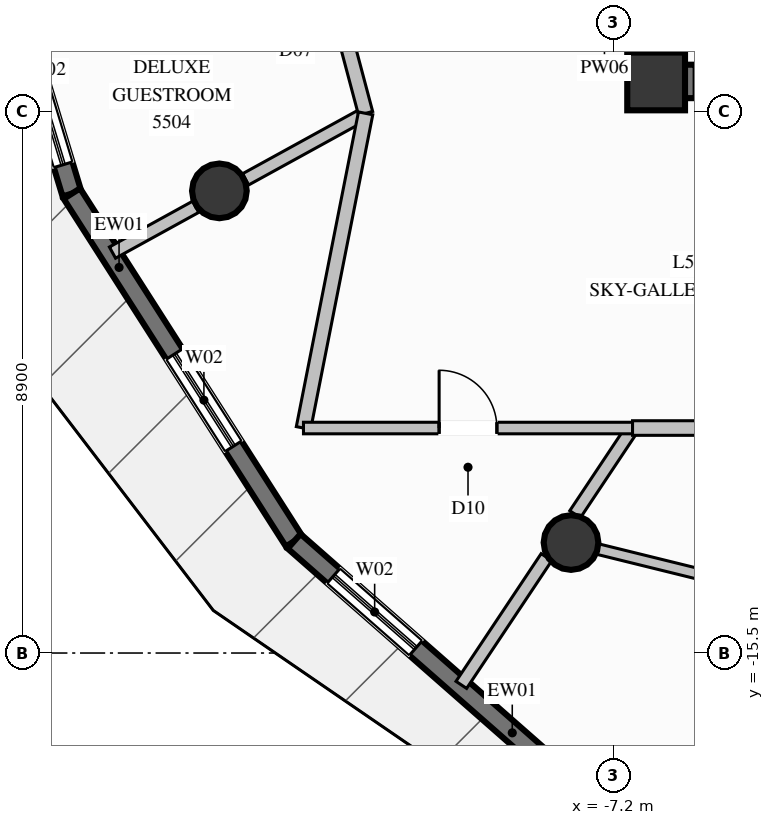
"""IFC4 building model, lengths in metres.
Left out: names, types, materials, properties, quantities, classifications, styles, units other than length and angle.
Written with IfcOpenShell. Run it as: python <this file> out.ifc"""

import sys

from ifc_helpers import new_model, si_unit, direction, frame, frame_2d, origin, origin_2d, place, context, subcontext, project, spatial, rectangle, circle, extrude, element, fill, save


model = new_model("IFC4")
c1 = context("Model", 3, precision=1e-05, world=origin(), true_north=direction((0.0, 1.0)))
c2 = subcontext(c1, "Body", "Model", "MODEL_VIEW")
j1 = project(units=[si_unit("LENGTHUNIT", "METRE"), si_unit("PLANEANGLEUNIT", "RADIAN")], contexts=[c1])
p1 = place(None, origin())
s1 = spatial("IfcSite", under=j1, at=p1, CompositionType="ELEMENT")
p2 = place(p1, origin())
s2 = spatial("IfcBuilding", under=s1, at=p2, CompositionType="ELEMENT")
p3 = place(p2, frame((0.0, 0.0, 205.6)))
s3 = spatial("IfcBuildingStorey", under=s2, at=p3, CompositionType="ELEMENT", Elevation=205.6)
p4 = place(p3, frame((-6.5, -6.1, 0.0), z_axis=(0.0, 0.0, 1.0), x_axis=(1.0, 0.0, 0.0)))
e1 = element("IfcColumn", 1, at=p4, inside=s3, PredefinedType="COLUMN", context=c2, shape_type="SweptSolid", body=[
    extrude(rectangle(XDim=0.95, YDim=0.95, at=origin_2d()), origin(), (0.0, 0.0, 1.0), 3.6),
])
p5 = place(p3, frame((-6.225, -6.1, 0.0), z_axis=(0.0, 0.0, 1.0), x_axis=(1.0, 0.0, 0.0)))
e2 = element("IfcWall", 2, at=p5, inside=s3, PredefinedType="SHEAR", context=c2, shape_type="SweptSolid", body=[
    extrude(rectangle(XDim=0.375, YDim=0.55, at=frame_2d((0.188, 0.0))), origin(), (0.0, 0.0, 1.0), 3.6),
])
p6 = place(p3, frame((-6.5, -6.375, 0.0), z_axis=(0.0, 0.0, 1.0), x_axis=(0.0, 1.0, 0.0)))
e3 = element("IfcWall", 3, at=p6, inside=s3, PredefinedType="SHEAR", context=c2, shape_type="SweptSolid", body=[
    extrude(rectangle(XDim=3.025, YDim=0.55, at=frame_2d((1.512, 0.0))), origin(), (0.0, 0.0, 1.0), 3.6),
])
for number, where, z_axis, x_axis in (
    (4, (-13.683, -7.9, 0.0), (0.0, 0.0, 1.0), (1.0, 0.0, 0.0)),
    (5, (-7.9, -13.683, 0.0), (0.0, 0.0, 1.0), (1.0, 0.0, 0.0)),
):
    element("IfcColumn", number, at=place(p3, frame(where, z_axis=z_axis, x_axis=x_axis)), inside=s3, PredefinedType="COLUMN", context=c2, shape_type="SweptSolid", body=[
        extrude(circle(Radius=0.45, at=origin_2d()), origin(), (0.0, 0.0, 1.0), 3.6),
    ])
p7 = place(p3, frame((-16.109, -7.945, 0.0), z_axis=(0.0, 0.0, 1.0), x_axis=(-0.289756727298, 0.957100328589, 0.0)))
e6 = element("IfcWall", 6, at=p7, inside=s3, PredefinedType="SOLIDWALL", context=c2, shape_type="SweptSolid", body=[
    extrude(rectangle(XDim=6.785, YDim=0.32, at=frame_2d((3.393, 0.0))), origin(), (0.0, 0.0, 1.0), 3.36),
])
p8 = place(p7, frame((0.496, 0.0, 0.35)))
e7 = element("IfcOpeningElement", 7, at=p8, cuts=e6, PredefinedType="OPENING", context=c2, shape_type="SweptSolid", body=[
    extrude(rectangle(XDim=1.8, YDim=2.6, at=frame_2d((0.9, 1.3))), frame((0.0, 0.17, 0.0), z_axis=(0.0, -1.0, 0.0), x_axis=(1.0, 0.0, 0.0)), (0.0, 0.0, 1.0), 0.34),
])
p9 = place(p7, frame((2.843, 0.0, 0.0)))
e8 = element("IfcOpeningElement", 8, at=p9, cuts=e6, PredefinedType="OPENING", context=c2, shape_type="SweptSolid", body=[
    extrude(rectangle(XDim=1.1, YDim=2.2, at=frame_2d((0.55, 1.1))), frame((0.0, 0.17, 0.0), z_axis=(0.0, -1.0, 0.0), x_axis=(1.0, 0.0, 0.0)), (0.0, 0.0, 1.0), 0.34),
])
p10 = place(p3, frame((-12.454, -13.662, 0.0), z_axis=(0.0, 0.0, 1.0), x_axis=(-0.538622762642, 0.842547042938, 0.0)))
e9 = element("IfcWall", 9, at=p10, inside=s3, PredefinedType="SOLIDWALL", context=c2, shape_type="SweptSolid", body=[
    extrude(rectangle(XDim=6.785, YDim=0.32, at=frame_2d((3.393, 0.0))), origin(), (0.0, 0.0, 1.0), 3.36),
])
p11 = place(p10, frame((1.854, 0.0, 0.35)))
e10 = element("IfcOpeningElement", 10, at=p11, cuts=e9, PredefinedType="OPENING", context=c2, shape_type="SweptSolid", body=[
    extrude(rectangle(XDim=1.8, YDim=2.6, at=frame_2d((0.9, 1.3))), frame((0.0, 0.17, 0.0), z_axis=(0.0, -1.0, 0.0), x_axis=(1.0, 0.0, 0.0)), (0.0, 0.0, 1.0), 0.34),
])
p12 = place(p3, frame((-7.467, -18.041, 0.0), z_axis=(0.0, 0.0, 1.0), x_axis=(-0.751438445652, 0.659803199746, 0.0)))
e11 = element("IfcWall", 11, at=p12, inside=s3, PredefinedType="SOLIDWALL", context=c2, shape_type="SweptSolid", body=[
    extrude(rectangle(XDim=6.637, YDim=0.32, at=frame_2d((3.318, 0.0))), origin(), (0.0, 0.0, 1.0), 3.36),
])
p13 = place(p12, frame((3.974, 0.0, 0.35)))
e12 = element("IfcOpeningElement", 12, at=p13, cuts=e11, PredefinedType="OPENING", context=c2, shape_type="SweptSolid", body=[
    extrude(rectangle(XDim=1.8, YDim=2.6, at=frame_2d((0.9, 1.3))), frame((0.0, 0.17, 0.0), z_axis=(0.0, -1.0, 0.0), x_axis=(1.0, 0.0, 0.0)), (0.0, 0.0, 1.0), 0.34),
])
p14 = place(p3, frame((-11.278, -6.625, 0.0), z_axis=(0.0, 0.0, 1.0), x_axis=(-0.876259360779, -0.481839737513, 0.0)))
e13 = element("IfcWall", 13, at=p14, inside=s3, PredefinedType="PARTITIONING", context=c2, shape_type="SweptSolid", body=[
    extrude(rectangle(XDim=2.254, YDim=0.21, at=frame_2d((1.127, 0.0))), origin(), (0.0, 0.0, 1.0), 2.877),
])
p15 = place(p3, frame((-14.073, -8.162, 0.0), z_axis=(0.0, 0.0, 1.0), x_axis=(-0.876060708042, -0.482200825201, 0.0)))
e14 = element("IfcWall", 14, at=p15, inside=s3, PredefinedType="PARTITIONING", context=c2, shape_type="SweptSolid", body=[
    extrude(rectangle(XDim=1.562, YDim=0.21, at=frame_2d((0.781, 0.0))), origin(), (0.0, 0.0, 1.0), 3.36),
])
p16 = place(p3, frame((-12.277, -2.869, 0.0), z_axis=(0.0, 0.0, 1.0), x_axis=(0.257037057674, -0.966401547486, 0.0)))
e15 = element("IfcWall", 15, at=p16, inside=s3, PredefinedType="PARTITIONING", context=c2, shape_type="SweptSolid", body=[
    extrude(rectangle(XDim=3.887, YDim=0.24, at=frame_2d((1.943, 0.0))), origin(), (0.0, 0.0, 1.0), 3.36),
])
p17 = place(p16, frame((1.443, 0.0, 0.0)))
e16 = element("IfcOpeningElement", 16, at=p17, cuts=e15, PredefinedType="OPENING", context=c2, shape_type="SweptSolid", body=[
    extrude(rectangle(XDim=1.0, YDim=2.2, at=frame_2d((0.5, 1.1))), frame((0.0, 0.13, 0.0), z_axis=(0.0, -1.0, 0.0), x_axis=(1.0, 0.0, 0.0)), (0.0, 0.0, 1.0), 0.26),
])
p18 = place(p3, frame((-6.888, -11.8, 0.0), z_axis=(0.0, 0.0, 1.0), x_axis=(-0.554601004854, -0.832116413379, 0.0)))
e17 = element("IfcWall", 17, at=p18, inside=s3, PredefinedType="PARTITIONING", context=c2, shape_type="SweptSolid", body=[
    extrude(rectangle(XDim=1.704, YDim=0.21, at=frame_2d((0.852, 0.0))), origin(), (0.0, 0.0, 1.0), 2.877),
])
p19 = place(p3, frame((-8.304, -13.924, 0.0), z_axis=(0.0, 0.0, 1.0), x_axis=(-0.55476716384, -0.832005645368, 0.0)))
e18 = element("IfcWall", 18, at=p19, inside=s3, PredefinedType="PARTITIONING", context=c2, shape_type="SweptSolid", body=[
    extrude(rectangle(XDim=2.524, YDim=0.21, at=frame_2d((1.262, 0.0))), origin(), (0.0, 0.0, 1.0), 3.36),
])
p20 = place(p3, frame((-11.278, -6.625, 0.0), z_axis=(0.0, 0.0, 1.0), x_axis=(-0.193739123744, -0.981053083136, 0.0)))
e19 = element("IfcWall", 19, at=p20, inside=s3, PredefinedType="PARTITIONING", context=c2, shape_type="SweptSolid", body=[
    extrude(rectangle(XDim=5.275, YDim=0.24, at=frame_2d((2.637, 0.0))), origin(), (0.0, 0.0, 1.0), 3.36),
])
p21 = place(p3, frame((-12.3, -11.8, 0.0), z_axis=(0.0, 0.0, 1.0), x_axis=(1.0, 0.0, 0.0)))
e20 = element("IfcWall", 20, at=p21, inside=s3, PredefinedType="PARTITIONING", context=c2, shape_type="SweptSolid", body=[
    extrude(rectangle(XDim=5.412, YDim=0.19, at=frame_2d((2.706, 0.0))), origin(), (0.0, 0.0, 1.0), 3.36),
])
p22 = place(p21, frame((2.231, 0.0, 0.0)))
e21 = element("IfcOpeningElement", 21, at=p22, cuts=e20, PredefinedType="OPENING", context=c2, shape_type="SweptSolid", body=[
    extrude(rectangle(XDim=0.95, YDim=2.1, at=frame_2d((0.475, 1.05))), frame((0.0, 0.105, 0.0), z_axis=(0.0, -1.0, 0.0), x_axis=(1.0, 0.0, 0.0)), (0.0, 0.0, 1.0), 0.21),
])
p23 = place(p3, frame((-6.888, -11.8, 0.0), z_axis=(0.0, 0.0, 1.0), x_axis=(1.0, 0.0, 0.0)))
e22 = element("IfcWall", 22, at=p23, inside=s3, PredefinedType="PARTITIONING", context=c2, shape_type="SweptSolid", body=[
    extrude(rectangle(XDim=3.031, YDim=0.24, at=frame_2d((1.516, 0.0))), origin(), (0.0, 0.0, 1.0), 3.36),
])
p24 = place(p3, frame((-8.108, -13.631, 0.0), z_axis=(0.0, 0.0, 1.0), x_axis=(0.97090688322, -0.23945735344, 0.0)))
e23 = element("IfcWall", 23, at=p24, inside=s3, PredefinedType="PLUMBINGWALL", context=c2, shape_type="SweptSolid", body=[
    extrude(rectangle(XDim=3.846, YDim=0.175, at=frame_2d((1.923, 0.0))), origin(), (0.0, 0.0, 1.0), 2.929),
])
p25 = place(p8, origin())
e24 = element("IfcWindow", 24, at=p25, inside=s3, PartitioningType="SINGLE_PANEL", PredefinedType="WINDOW", context=c2, shape_type="SweptSolid", body=[
    extrude(rectangle(XDim=1.8, YDim=2.6, at=frame_2d((0.9, 1.3))), frame((0.0, 0.03, 0.0), z_axis=(0.0, -1.0, 0.0), x_axis=(1.0, 0.0, 0.0)), (0.0, 0.0, 1.0), 0.06),
])
fill(e7, e24)
p26 = place(p11, origin())
e25 = element("IfcWindow", 25, at=p26, inside=s3, PartitioningType="SINGLE_PANEL", PredefinedType="WINDOW", context=c2, shape_type="SweptSolid", body=[
    extrude(rectangle(XDim=1.8, YDim=2.6, at=frame_2d((0.9, 1.3))), frame((0.0, 0.03, 0.0), z_axis=(0.0, -1.0, 0.0), x_axis=(1.0, 0.0, 0.0)), (0.0, 0.0, 1.0), 0.06),
])
fill(e10, e25)
p27 = place(p13, origin())
e26 = element("IfcWindow", 26, at=p27, inside=s3, PartitioningType="SINGLE_PANEL", PredefinedType="WINDOW", context=c2, shape_type="SweptSolid", body=[
    extrude(rectangle(XDim=1.8, YDim=2.6, at=frame_2d((0.9, 1.3))), frame((0.0, 0.03, 0.0), z_axis=(0.0, -1.0, 0.0), x_axis=(1.0, 0.0, 0.0)), (0.0, 0.0, 1.0), 0.06),
])
fill(e12, e26)
p28 = place(p22, origin())
e27 = element("IfcDoor", 27, at=p28, inside=s3, OperationType="SINGLE_SWING_LEFT", PredefinedType="DOOR", context=c2, shape_type="SweptSolid", body=[
    extrude(rectangle(XDim=0.95, YDim=2.1, at=frame_2d((0.475, 1.05))), frame((0.0, 0.025, 0.0), z_axis=(0.0, -1.0, 0.0), x_axis=(1.0, 0.0, 0.0)), (0.0, 0.0, 1.0), 0.05),
])
fill(e21, e27)
save(model, sys.argv[1])
